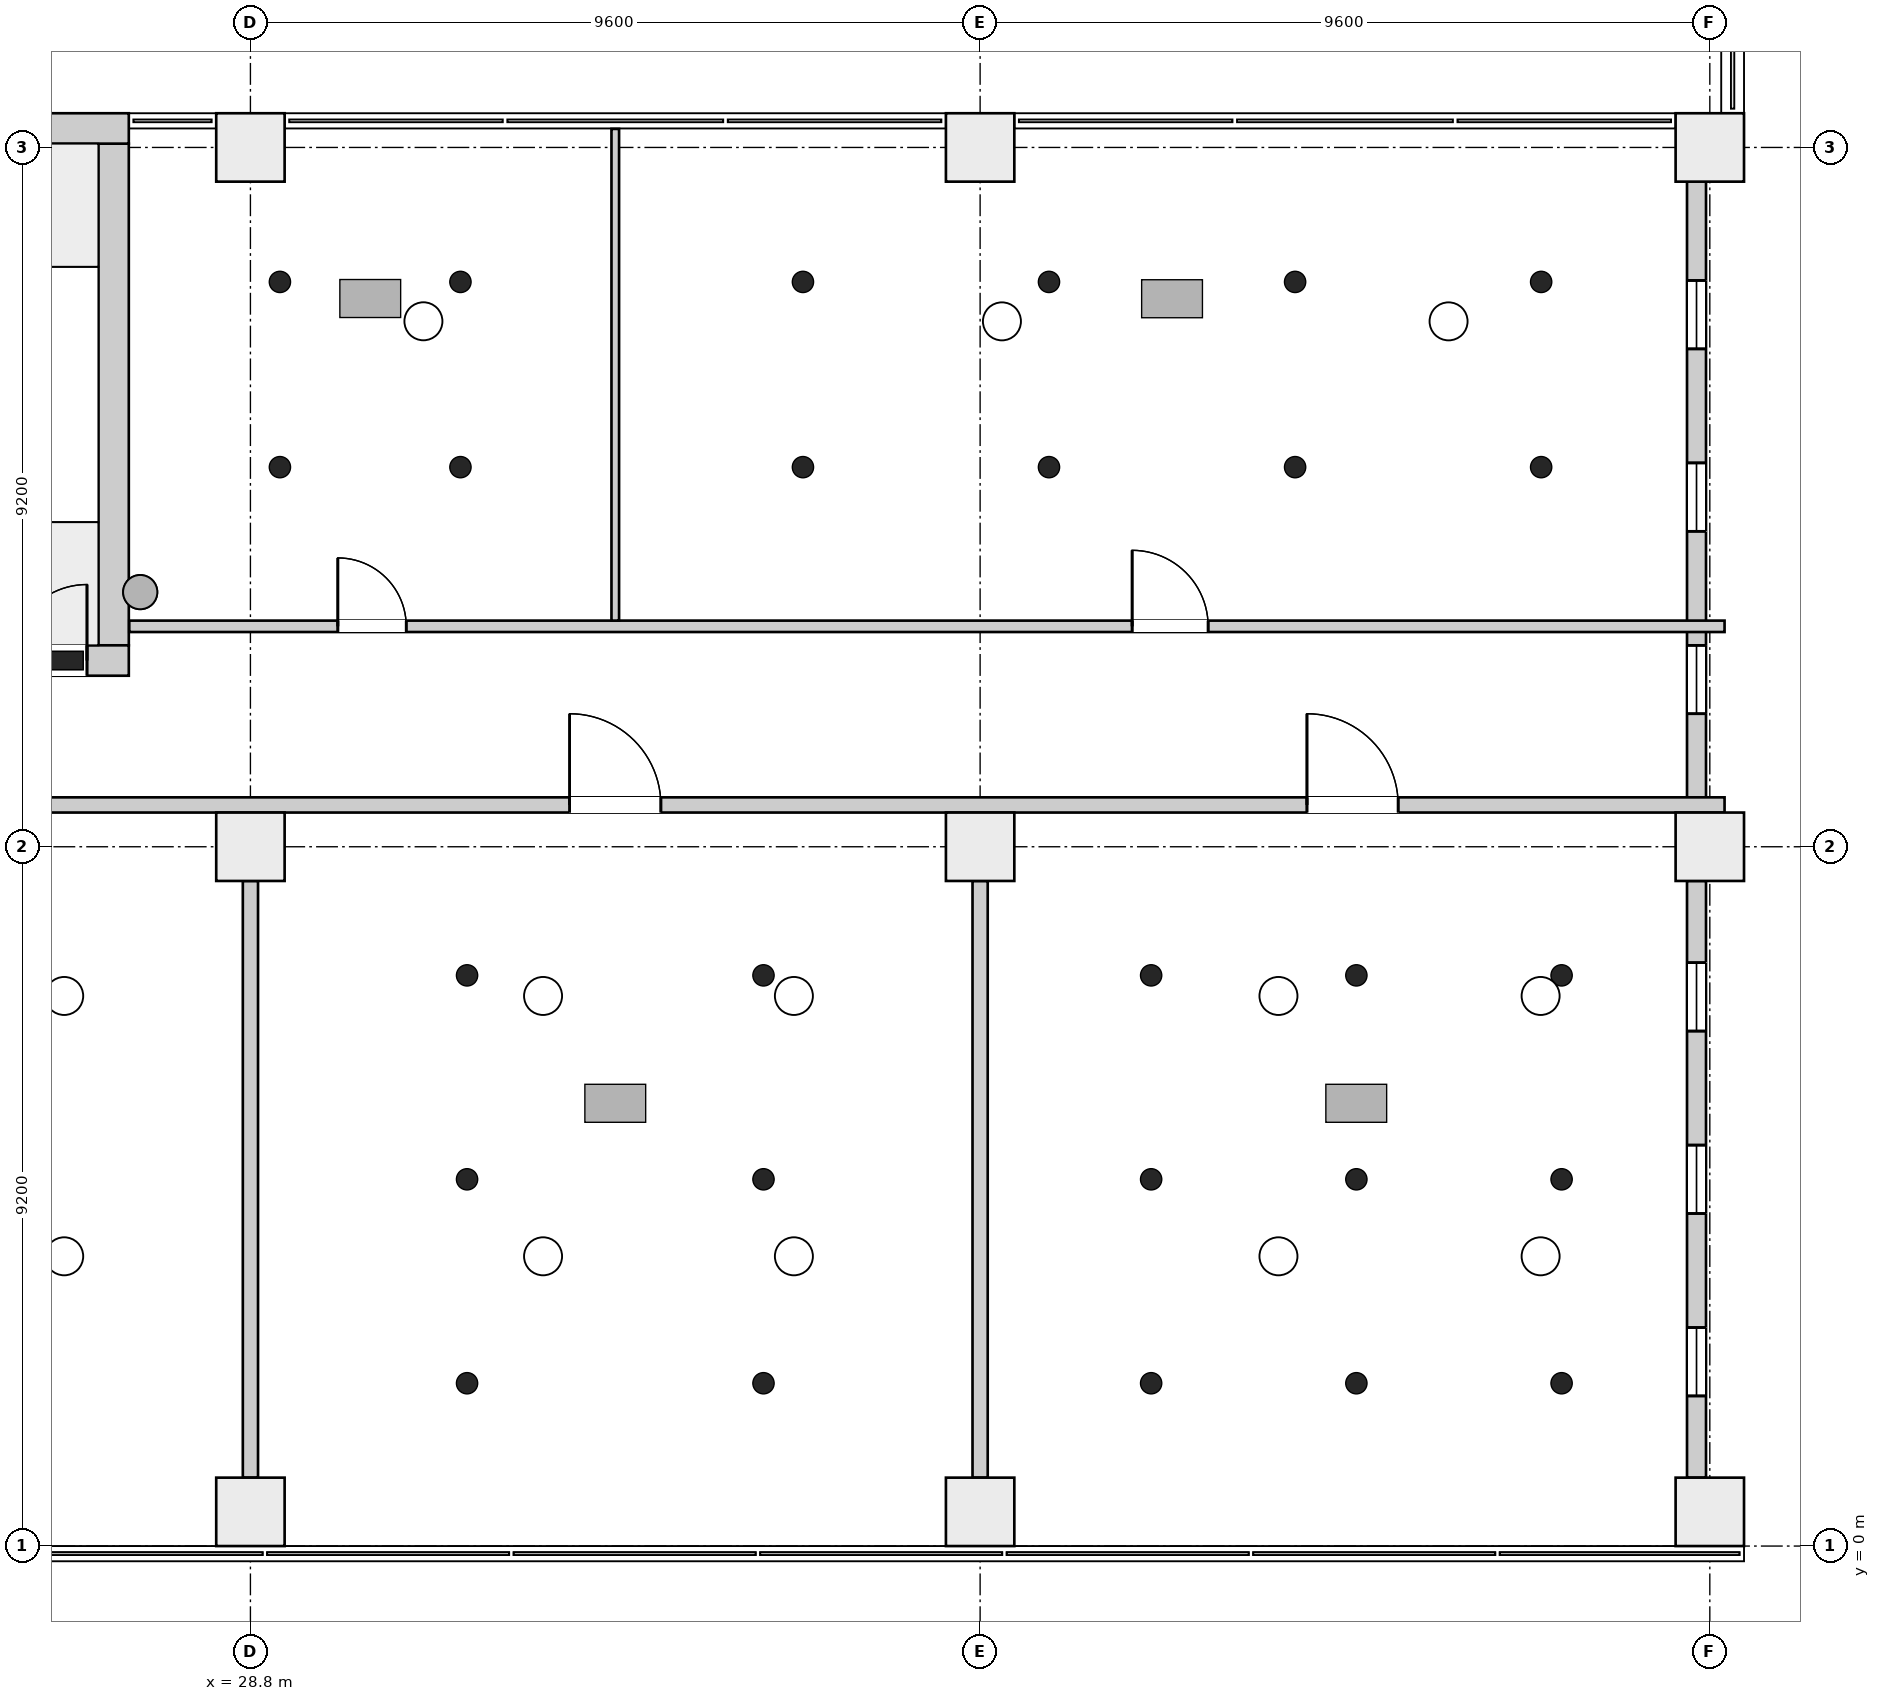
"""IFC4 building model, lengths in metres.
Left out: names, types, materials, properties, quantities, classifications, styles, units other than length and angle.
Written with IfcOpenShell. Run it as: python <this file> out.ifc"""

import sys

from ifc_helpers import new_model, si_unit, direction, frame, frame_2d, origin, origin_2d, place, context, subcontext, project, spatial, rectangle, extrude, element, fill, save


model = new_model("IFC4")
c1 = context("Model", 3, precision=1e-05, world=origin(), true_north=direction((0.0, 1.0)))
c2 = subcontext(c1, "Body", "Model", "MODEL_VIEW")
j1 = project(units=[si_unit("LENGTHUNIT", "METRE"), si_unit("PLANEANGLEUNIT", "RADIAN")], contexts=[c1])
p1 = place(None, origin())
s1 = spatial("IfcSite", under=j1, at=p1, CompositionType="ELEMENT")
p2 = place(p1, origin())
s2 = spatial("IfcBuilding", under=s1, at=p2, CompositionType="ELEMENT")
p3 = place(p2, frame((0.0, 0.0, 36.1)))
s3 = spatial("IfcBuildingStorey", under=s2, at=p3, CompositionType="ELEMENT", Elevation=36.1)
p4 = place(p3, frame((23.0, 11.65, 0.0), z_axis=(0.0, 0.0, 1.0), x_axis=(1.0, 0.0, 0.0)))
e1 = element("IfcWall", 1, at=p4, inside=s3, PredefinedType="SHEAR", context=c2, shape_type="SweptSolid", body=[
    extrude(rectangle(XDim=4.2, YDim=0.4, at=frame_2d((2.1, 0.0))), origin(), (0.0, 0.0, 1.0), 4.2),
])
p5 = place(p4, frame((0.55, 0.0, 0.0)))
e2 = element("IfcOpeningElement", 2, at=p5, cuts=e1, PredefinedType="OPENING", context=c2, shape_type="SweptSolid", body=[
    extrude(rectangle(XDim=1.0, YDim=2.1, at=frame_2d((0.5, 1.05))), frame((0.0, 0.21, 0.0), z_axis=(0.0, -1.0, 0.0), x_axis=(1.0, 0.0, 0.0)), (0.0, 0.0, 1.0), 0.42),
])
p6 = place(p4, frame((2.65, 0.0, 0.0)))
e3 = element("IfcOpeningElement", 3, at=p6, cuts=e1, PredefinedType="OPENING", context=c2, shape_type="SweptSolid", body=[
    extrude(rectangle(XDim=1.0, YDim=2.1, at=frame_2d((0.5, 1.05))), frame((0.0, 0.21, 0.0), z_axis=(0.0, -1.0, 0.0), x_axis=(1.0, 0.0, 0.0)), (0.0, 0.0, 1.0), 0.42),
])
p7 = place(p3, frame((23.0, 18.65, 0.0), z_axis=(0.0, 0.0, 1.0), x_axis=(1.0, 0.0, 0.0)))
e4 = element("IfcWall", 4, at=p7, inside=s3, PredefinedType="SHEAR", context=c2, shape_type="SweptSolid", body=[
    extrude(rectangle(XDim=4.2, YDim=0.4, at=frame_2d((2.1, 0.0))), origin(), (0.0, 0.0, 1.0), 4.2),
])
p8 = place(p3, frame((27.0, 11.85, 0.0), z_axis=(0.0, 0.0, 1.0), x_axis=(0.0, 1.0, 0.0)))
e5 = element("IfcWall", 5, at=p8, inside=s3, PredefinedType="SHEAR", context=c2, shape_type="SweptSolid", body=[
    extrude(rectangle(XDim=6.6, YDim=0.4, at=frame_2d((3.3, 0.0))), origin(), (0.0, 0.0, 1.0), 4.2),
])
for number, where, z_axis, x_axis in (
    (6, (28.8, 0.45, 0.0), (0.0, 0.0, 1.0), (1.0, 0.0, 0.0)),
    (7, (38.4, 0.45, 0.0), (0.0, 0.0, 1.0), (1.0, 0.0, 0.0)),
    (8, (48.0, 0.45, 0.0), (0.0, 0.0, 1.0), (1.0, 0.0, 0.0)),
    (9, (28.8, 9.2, 0.0), (0.0, 0.0, 1.0), (1.0, 0.0, 0.0)),
    (10, (38.4, 9.2, 0.0), (0.0, 0.0, 1.0), (1.0, 0.0, 0.0)),
    (11, (48.0, 9.2, 0.0), (0.0, 0.0, 1.0), (1.0, 0.0, 0.0)),
    (12, (28.8, 18.4, 0.0), (0.0, 0.0, 1.0), (1.0, 0.0, 0.0)),
    (13, (38.4, 18.4, 0.0), (0.0, 0.0, 1.0), (1.0, 0.0, 0.0)),
    (14, (48.0, 18.4, 0.0), (0.0, 0.0, 1.0), (1.0, 0.0, 0.0)),
):
    element("IfcColumn", number, at=place(p3, frame(where, z_axis=z_axis, x_axis=x_axis)), inside=s3, PredefinedType="COLUMN", context=c2, shape_type="SweptSolid", body=[
        extrude(rectangle(XDim=0.9, YDim=0.9, at=origin_2d()), origin(), (0.0, 0.0, 1.0), 4.2),
    ])
p9 = place(p3, frame((47.825, 0.9, 0.0), z_axis=(0.0, 0.0, 1.0), x_axis=(0.0, 1.0, 0.0)))
e15 = element("IfcWall", 15, at=p9, inside=s3, PredefinedType="ELEMENTEDWALL", context=c2, shape_type="SweptSolid", body=[
    extrude(rectangle(XDim=7.85, YDim=0.25, at=frame_2d((3.925, 0.0))), origin(), (0.0, 0.0, 1.0), 3.3),
])
p10 = place(p9, frame((1.075, 0.0, 0.6)))
e16 = element("IfcOpeningElement", 16, at=p10, cuts=e15, PredefinedType="OPENING", context=c2, shape_type="SweptSolid", body=[
    extrude(rectangle(XDim=0.9, YDim=2.6, at=frame_2d((0.45, 1.3))), frame((0.0, 0.135, 0.0), z_axis=(0.0, -1.0, 0.0), x_axis=(1.0, 0.0, 0.0)), (0.0, 0.0, 1.0), 0.27),
])
p11 = place(p9, frame((3.475, 0.0, 0.6)))
e17 = element("IfcOpeningElement", 17, at=p11, cuts=e15, PredefinedType="OPENING", context=c2, shape_type="SweptSolid", body=[
    extrude(rectangle(XDim=0.9, YDim=2.6, at=frame_2d((0.45, 1.3))), frame((0.0, 0.135, 0.0), z_axis=(0.0, -1.0, 0.0), x_axis=(1.0, 0.0, 0.0)), (0.0, 0.0, 1.0), 0.27),
])
p12 = place(p9, frame((5.875, 0.0, 0.6)))
e18 = element("IfcOpeningElement", 18, at=p12, cuts=e15, PredefinedType="OPENING", context=c2, shape_type="SweptSolid", body=[
    extrude(rectangle(XDim=0.9, YDim=2.6, at=frame_2d((0.45, 1.3))), frame((0.0, 0.135, 0.0), z_axis=(0.0, -1.0, 0.0), x_axis=(1.0, 0.0, 0.0)), (0.0, 0.0, 1.0), 0.27),
])
p13 = place(p3, frame((47.825, 9.65, 0.0), z_axis=(0.0, 0.0, 1.0), x_axis=(0.0, 1.0, 0.0)))
e19 = element("IfcWall", 19, at=p13, inside=s3, PredefinedType="ELEMENTEDWALL", context=c2, shape_type="SweptSolid", body=[
    extrude(rectangle(XDim=8.3, YDim=0.25, at=frame_2d((4.15, 0.0))), origin(), (0.0, 0.0, 1.0), 3.3),
])
p14 = place(p13, frame((1.3, 0.0, 0.6)))
e20 = element("IfcOpeningElement", 20, at=p14, cuts=e19, PredefinedType="OPENING", context=c2, shape_type="SweptSolid", body=[
    extrude(rectangle(XDim=0.9, YDim=2.6, at=frame_2d((0.45, 1.3))), frame((0.0, 0.135, 0.0), z_axis=(0.0, -1.0, 0.0), x_axis=(1.0, 0.0, 0.0)), (0.0, 0.0, 1.0), 0.27),
])
p15 = place(p13, frame((3.7, 0.0, 0.6)))
e21 = element("IfcOpeningElement", 21, at=p15, cuts=e19, PredefinedType="OPENING", context=c2, shape_type="SweptSolid", body=[
    extrude(rectangle(XDim=0.9, YDim=2.6, at=frame_2d((0.45, 1.3))), frame((0.0, 0.135, 0.0), z_axis=(0.0, -1.0, 0.0), x_axis=(1.0, 0.0, 0.0)), (0.0, 0.0, 1.0), 0.27),
])
p16 = place(p13, frame((6.1, 0.0, 0.6)))
e22 = element("IfcOpeningElement", 22, at=p16, cuts=e19, PredefinedType="OPENING", context=c2, shape_type="SweptSolid", body=[
    extrude(rectangle(XDim=0.9, YDim=2.6, at=frame_2d((0.45, 1.3))), frame((0.0, 0.135, 0.0), z_axis=(0.0, -1.0, 0.0), x_axis=(1.0, 0.0, 0.0)), (0.0, 0.0, 1.0), 0.27),
])
p17 = place(p3, frame((4.3, 9.75, 0.0), z_axis=(0.0, 0.0, 1.0), x_axis=(1.0, 0.0, 0.0)))
e23 = element("IfcWall", 23, at=p17, inside=s3, PredefinedType="PARTITIONING", context=c2, shape_type="SweptSolid", body=[
    extrude(rectangle(XDim=43.894, YDim=0.2, at=frame_2d((21.947, 0.0))), origin(), (0.0, 0.0, 1.0), 3.9),
])
p18 = place(p17, frame((2.1, 0.0, 0.0)))
e24 = element("IfcOpeningElement", 24, at=p18, cuts=e23, PredefinedType="OPENING", context=c2, shape_type="SweptSolid", body=[
    extrude(rectangle(XDim=1.2, YDim=2.1, at=frame_2d((0.6, 1.05))), frame((0.0, 0.11, 0.0), z_axis=(0.0, -1.0, 0.0), x_axis=(1.0, 0.0, 0.0)), (0.0, 0.0, 1.0), 0.22),
])
p19 = place(p17, frame((9.5, 0.0, 0.0)))
e25 = element("IfcOpeningElement", 25, at=p19, cuts=e23, PredefinedType="OPENING", context=c2, shape_type="SweptSolid", body=[
    extrude(rectangle(XDim=1.2, YDim=2.1, at=frame_2d((0.6, 1.05))), frame((0.0, 0.11, 0.0), z_axis=(0.0, -1.0, 0.0), x_axis=(1.0, 0.0, 0.0)), (0.0, 0.0, 1.0), 0.22),
])
p20 = place(p17, frame((19.1, 0.0, 0.0)))
e26 = element("IfcOpeningElement", 26, at=p20, cuts=e23, PredefinedType="OPENING", context=c2, shape_type="SweptSolid", body=[
    extrude(rectangle(XDim=1.2, YDim=2.1, at=frame_2d((0.6, 1.05))), frame((0.0, 0.11, 0.0), z_axis=(0.0, -1.0, 0.0), x_axis=(1.0, 0.0, 0.0)), (0.0, 0.0, 1.0), 0.22),
])
p21 = place(p17, frame((28.7, 0.0, 0.0)))
e27 = element("IfcOpeningElement", 27, at=p21, cuts=e23, PredefinedType="OPENING", context=c2, shape_type="SweptSolid", body=[
    extrude(rectangle(XDim=1.2, YDim=2.1, at=frame_2d((0.6, 1.05))), frame((0.0, 0.11, 0.0), z_axis=(0.0, -1.0, 0.0), x_axis=(1.0, 0.0, 0.0)), (0.0, 0.0, 1.0), 0.22),
])
p22 = place(p17, frame((38.4, 0.0, 0.0)))
e28 = element("IfcOpeningElement", 28, at=p22, cuts=e23, PredefinedType="OPENING", context=c2, shape_type="SweptSolid", body=[
    extrude(rectangle(XDim=1.2, YDim=2.1, at=frame_2d((0.6, 1.05))), frame((0.0, 0.11, 0.0), z_axis=(0.0, -1.0, 0.0), x_axis=(1.0, 0.0, 0.0)), (0.0, 0.0, 1.0), 0.22),
])
p23 = place(p3, frame((27.206, 12.1, 0.0), z_axis=(0.0, 0.0, 1.0), x_axis=(1.0, 0.0, 0.0)))
e29 = element("IfcWall", 29, at=p23, inside=s3, PredefinedType="PARTITIONING", context=c2, shape_type="SweptSolid", body=[
    extrude(rectangle(XDim=20.988, YDim=0.15, at=frame_2d((10.494, 0.0))), origin(), (0.0, 0.0, 1.0), 3.9),
])
p24 = place(p23, frame((2.744, 0.0, 0.0)))
e30 = element("IfcOpeningElement", 30, at=p24, cuts=e29, PredefinedType="OPENING", context=c2, shape_type="SweptSolid", body=[
    extrude(rectangle(XDim=0.9, YDim=2.1, at=frame_2d((0.45, 1.05))), frame((0.0, 0.085, 0.0), z_axis=(0.0, -1.0, 0.0), x_axis=(1.0, 0.0, 0.0)), (0.0, 0.0, 1.0), 0.17),
])
p25 = place(p23, frame((13.194, 0.0, 0.0)))
e31 = element("IfcOpeningElement", 31, at=p25, cuts=e29, PredefinedType="OPENING", context=c2, shape_type="SweptSolid", body=[
    extrude(rectangle(XDim=1.0, YDim=2.1, at=frame_2d((0.5, 1.05))), frame((0.0, 0.085, 0.0), z_axis=(0.0, -1.0, 0.0), x_axis=(1.0, 0.0, 0.0)), (0.0, 0.0, 1.0), 0.17),
])
p26 = place(p3, frame((28.8, 0.9, 0.0), z_axis=(0.0, 0.0, 1.0), x_axis=(0.0, 1.0, 0.0)))
e32 = element("IfcWall", 32, at=p26, inside=s3, PredefinedType="PARTITIONING", context=c2, shape_type="SweptSolid", body=[
    extrude(rectangle(XDim=7.85, YDim=0.2, at=frame_2d((3.925, 0.0))), origin(), (0.0, 0.0, 1.0), 3.9),
])
p27 = place(p3, frame((33.6, 12.175, 0.0), z_axis=(0.0, 0.0, 1.0), x_axis=(0.0, 1.0, 0.0)))
e33 = element("IfcWall", 33, at=p27, inside=s3, PredefinedType="PARTITIONING", context=c2, shape_type="SweptSolid", body=[
    extrude(rectangle(XDim=6.469, YDim=0.1, at=frame_2d((3.234, 0.0))), origin(), (0.0, 0.0, 1.0), 3.9),
])
p28 = place(p3, frame((38.4, 0.9, 0.0), z_axis=(0.0, 0.0, 1.0), x_axis=(0.0, 1.0, 0.0)))
e34 = element("IfcWall", 34, at=p28, inside=s3, PredefinedType="PARTITIONING", context=c2, shape_type="SweptSolid", body=[
    extrude(rectangle(XDim=7.85, YDim=0.2, at=frame_2d((3.925, 0.0))), origin(), (0.0, 0.0, 1.0), 3.9),
])
p29 = place(p10, origin())
e35 = element("IfcWindow", 35, at=p29, inside=s3, PartitioningType="SINGLE_PANEL", PredefinedType="WINDOW", context=c2, shape_type="SweptSolid", body=[
    extrude(rectangle(XDim=0.9, YDim=2.6, at=frame_2d((0.45, 1.3))), frame((0.0, 0.03, 0.0), z_axis=(0.0, -1.0, 0.0), x_axis=(1.0, 0.0, 0.0)), (0.0, 0.0, 1.0), 0.06),
])
fill(e16, e35)
p30 = place(p11, origin())
e36 = element("IfcWindow", 36, at=p30, inside=s3, PartitioningType="SINGLE_PANEL", PredefinedType="WINDOW", context=c2, shape_type="SweptSolid", body=[
    extrude(rectangle(XDim=0.9, YDim=2.6, at=frame_2d((0.45, 1.3))), frame((0.0, 0.03, 0.0), z_axis=(0.0, -1.0, 0.0), x_axis=(1.0, 0.0, 0.0)), (0.0, 0.0, 1.0), 0.06),
])
fill(e17, e36)
p31 = place(p12, origin())
e37 = element("IfcWindow", 37, at=p31, inside=s3, PartitioningType="SINGLE_PANEL", PredefinedType="WINDOW", context=c2, shape_type="SweptSolid", body=[
    extrude(rectangle(XDim=0.9, YDim=2.6, at=frame_2d((0.45, 1.3))), frame((0.0, 0.03, 0.0), z_axis=(0.0, -1.0, 0.0), x_axis=(1.0, 0.0, 0.0)), (0.0, 0.0, 1.0), 0.06),
])
fill(e18, e37)
p32 = place(p14, origin())
e38 = element("IfcWindow", 38, at=p32, inside=s3, PartitioningType="SINGLE_PANEL", PredefinedType="WINDOW", context=c2, shape_type="SweptSolid", body=[
    extrude(rectangle(XDim=0.9, YDim=2.6, at=frame_2d((0.45, 1.3))), frame((0.0, 0.03, 0.0), z_axis=(0.0, -1.0, 0.0), x_axis=(1.0, 0.0, 0.0)), (0.0, 0.0, 1.0), 0.06),
])
fill(e20, e38)
p33 = place(p15, origin())
e39 = element("IfcWindow", 39, at=p33, inside=s3, PartitioningType="SINGLE_PANEL", PredefinedType="WINDOW", context=c2, shape_type="SweptSolid", body=[
    extrude(rectangle(XDim=0.9, YDim=2.6, at=frame_2d((0.45, 1.3))), frame((0.0, 0.03, 0.0), z_axis=(0.0, -1.0, 0.0), x_axis=(1.0, 0.0, 0.0)), (0.0, 0.0, 1.0), 0.06),
])
fill(e21, e39)
p34 = place(p16, origin())
e40 = element("IfcWindow", 40, at=p34, inside=s3, PartitioningType="SINGLE_PANEL", PredefinedType="WINDOW", context=c2, shape_type="SweptSolid", body=[
    extrude(rectangle(XDim=0.9, YDim=2.6, at=frame_2d((0.45, 1.3))), frame((0.0, 0.03, 0.0), z_axis=(0.0, -1.0, 0.0), x_axis=(1.0, 0.0, 0.0)), (0.0, 0.0, 1.0), 0.06),
])
fill(e22, e40)
p35 = place(p6, origin())
e41 = element("IfcDoor", 41, at=p35, inside=s3, OperationType="SINGLE_SWING_LEFT", PredefinedType="DOOR", context=c2, shape_type="SweptSolid", body=[
    extrude(rectangle(XDim=1.0, YDim=2.1, at=frame_2d((0.5, 1.05))), frame((0.0, 0.025, 0.0), z_axis=(0.0, -1.0, 0.0), x_axis=(1.0, 0.0, 0.0)), (0.0, 0.0, 1.0), 0.05),
])
fill(e3, e41)
p36 = place(p21, origin())
e42 = element("IfcDoor", 42, at=p36, inside=s3, OperationType="SINGLE_SWING_RIGHT", PredefinedType="DOOR", context=c2, shape_type="SweptSolid", body=[
    extrude(rectangle(XDim=1.2, YDim=2.1, at=frame_2d((0.6, 1.05))), frame((0.0, 0.025, 0.0), z_axis=(0.0, -1.0, 0.0), x_axis=(1.0, 0.0, 0.0)), (0.0, 0.0, 1.0), 0.05),
])
fill(e27, e42)
p37 = place(p22, origin())
e43 = element("IfcDoor", 43, at=p37, inside=s3, OperationType="SINGLE_SWING_LEFT", PredefinedType="DOOR", context=c2, shape_type="SweptSolid", body=[
    extrude(rectangle(XDim=1.2, YDim=2.1, at=frame_2d((0.6, 1.05))), frame((0.0, 0.025, 0.0), z_axis=(0.0, -1.0, 0.0), x_axis=(1.0, 0.0, 0.0)), (0.0, 0.0, 1.0), 0.05),
])
fill(e28, e43)
p38 = place(p24, origin())
e44 = element("IfcDoor", 44, at=p38, inside=s3, OperationType="SINGLE_SWING_LEFT", PredefinedType="DOOR", context=c2, shape_type="SweptSolid", body=[
    extrude(rectangle(XDim=0.9, YDim=2.1, at=frame_2d((0.45, 1.05))), frame((0.0, 0.025, 0.0), z_axis=(0.0, -1.0, 0.0), x_axis=(1.0, 0.0, 0.0)), (0.0, 0.0, 1.0), 0.05),
])
fill(e30, e44)
p39 = place(p25, origin())
e45 = element("IfcDoor", 45, at=p39, inside=s3, OperationType="SINGLE_SWING_RIGHT", PredefinedType="DOOR", context=c2, shape_type="SweptSolid", body=[
    extrude(rectangle(XDim=1.0, YDim=2.1, at=frame_2d((0.5, 1.05))), frame((0.0, 0.025, 0.0), z_axis=(0.0, -1.0, 0.0), x_axis=(1.0, 0.0, 0.0)), (0.0, 0.0, 1.0), 0.05),
])
fill(e31, e45)
save(model, sys.argv[1])
